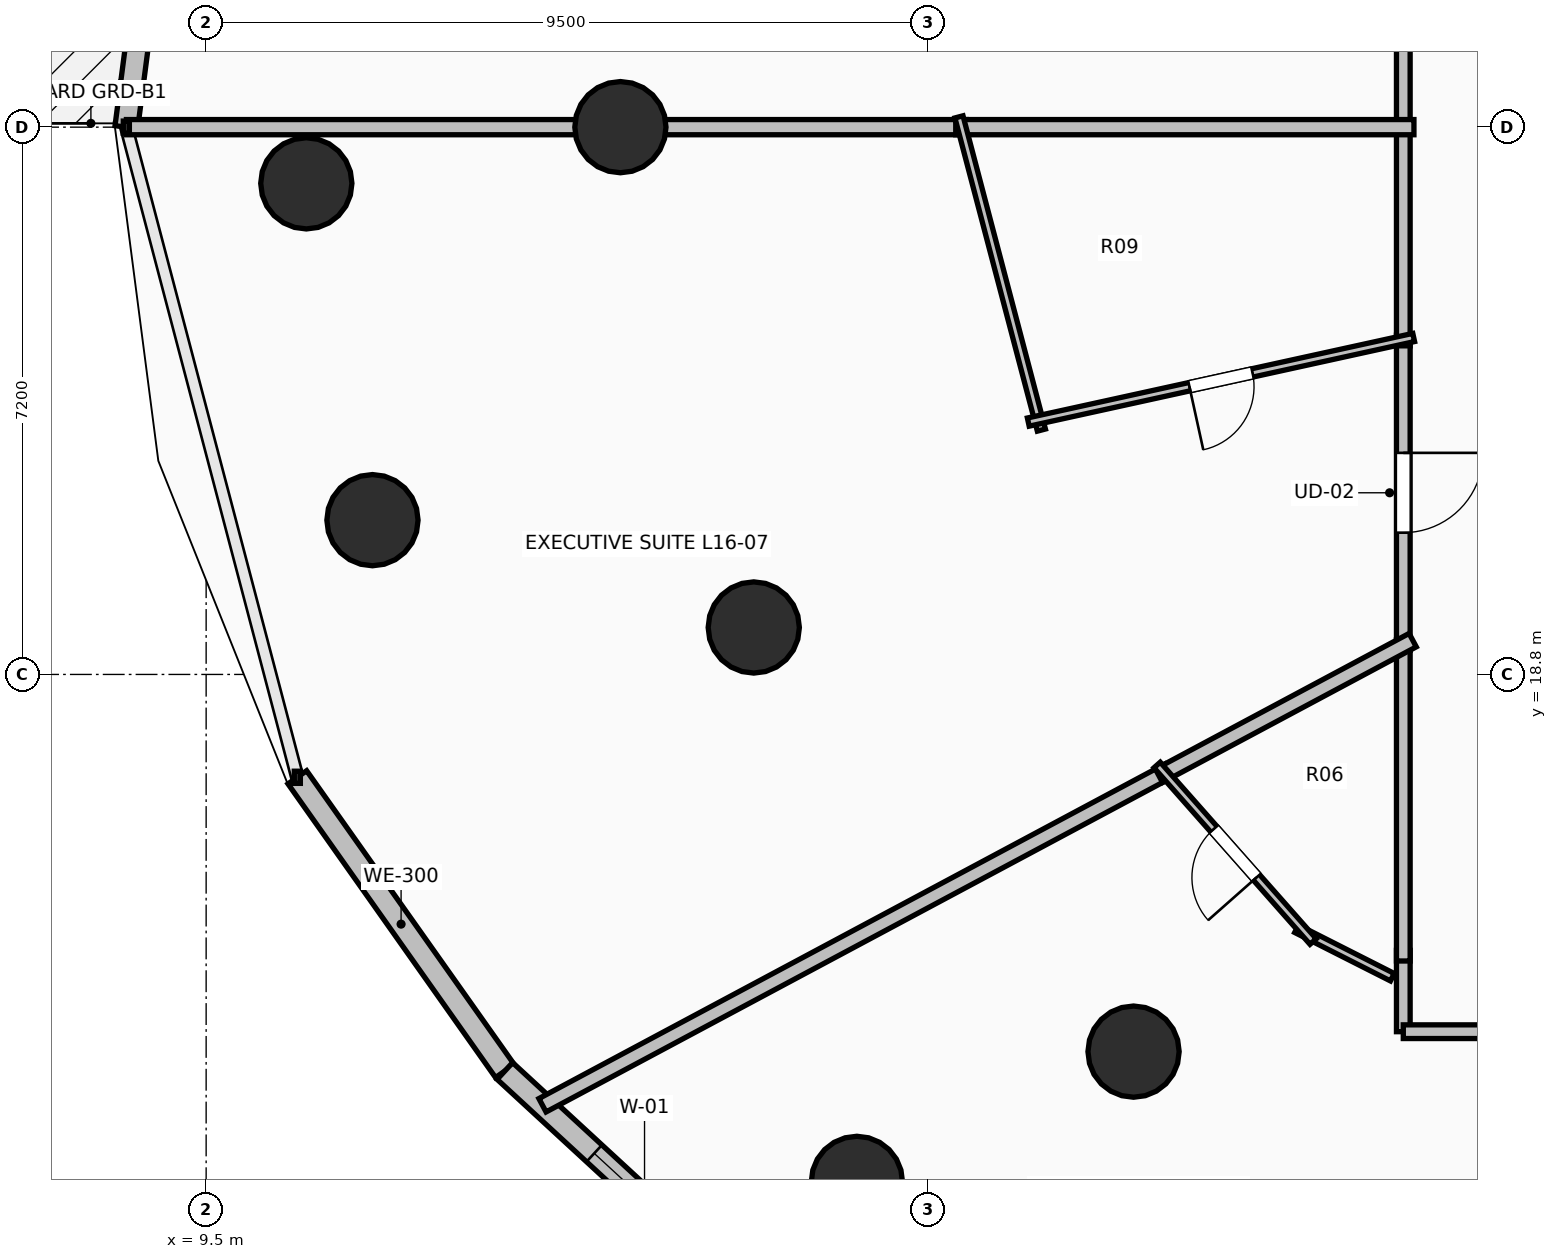
"""IFC4 building model, lengths in metres.
Left out: names, types, materials, properties, quantities, classifications, styles, units other than length and angle.
Written with IfcOpenShell. Run it as: python <this file> out.ifc"""

import sys

from ifc_helpers import new_model, si_unit, direction, frame, frame_2d, origin, origin_2d, place, context, subcontext, project, spatial, rectangle, circle, extrude, element, fill, save


model = new_model("IFC4")
c1 = context("Model", 3, precision=1e-05, world=origin(), true_north=direction((0.0, 1.0)))
c2 = subcontext(c1, "Body", "Model", "MODEL_VIEW")
j1 = project(units=[si_unit("LENGTHUNIT", "METRE"), si_unit("PLANEANGLEUNIT", "RADIAN")], contexts=[c1])
p1 = place(None, origin())
s1 = spatial("IfcSite", under=j1, at=p1, CompositionType="ELEMENT")
p2 = place(p1, origin())
s2 = spatial("IfcBuilding", under=s1, at=p2, CompositionType="ELEMENT")
p3 = place(p2, frame((0.0, 0.0, 62.5)))
s3 = spatial("IfcBuildingStorey", under=s2, at=p3, CompositionType="ELEMENT", Elevation=62.5)
for number, where, z_axis, x_axis in (
    (1, (14.95, 26.0, 0.0), (0.0, 0.0, 1.0), (-1.0, 0.0, 0.0)),
    (2, (16.705, 19.418, 0.0), (0.0, 0.0, 1.0), (-0.924, -0.383, 0.0)),
    (3, (21.701, 13.838, 0.0), (0.0, 0.0, 1.0), (-0.707, -0.707, 0.0)),
    (4, (10.818, 25.261, 0.0), (0.0, 0.0, 1.0), (-1.0, 0.0, 0.0)),
    (5, (11.688, 20.83, 0.0), (0.0, 0.0, 1.0), (-0.924, -0.383, 0.0)),
    (6, (18.061, 12.124, 0.0), (0.0, 0.0, 1.0), (-0.707, -0.707, 0.0)),
):
    element("IfcColumn", number, at=place(p3, frame(where, z_axis=z_axis, x_axis=x_axis)), inside=s3, PredefinedType="COLUMN", context=c2, shape_type="SweptSolid", body=[
        extrude(circle(Radius=0.6, at=origin_2d()), origin(), (0.0, 0.0, 1.0), 3.5),
    ])
p4 = place(p3, frame((9.018, 30.36, 0.0), z_axis=(0.0, 0.0, 1.0), x_axis=(-0.129144544413, -0.99162577954, 0.0)))
e7 = element("IfcWall", 7, at=p4, inside=s3, PredefinedType="STANDARD", context=c2, shape_type="SweptSolid", body=[
    extrude(rectangle(XDim=4.397, YDim=0.3, at=frame_2d((2.199, 0.0))), origin(), (0.0, 0.0, 1.0), 3.24),
])
p5 = place(p4, frame((1.299, 0.0, 0.85)))
e8 = element("IfcOpeningElement", 8, at=p5, cuts=e7, PredefinedType="OPENING", context=c2, shape_type="SweptSolid", body=[
    extrude(rectangle(XDim=1.8, YDim=2.19, at=frame_2d((0.9, 1.095))), frame((0.0, 0.165, 0.0), z_axis=(0.0, -1.0, 0.0), x_axis=(1.0, 0.0, 0.0)), (0.0, 0.0, 1.0), 0.33),
])
p6 = place(p3, frame((10.699, 17.447, 0.0), z_axis=(0.0, 0.0, 1.0), x_axis=(0.577130815624, -0.816651713803, 0.0)))
e9 = element("IfcWall", 9, at=p6, inside=s3, PredefinedType="STANDARD", context=c2, shape_type="SweptSolid", body=[
    extrude(rectangle(XDim=4.731, YDim=0.3, at=frame_2d((2.366, 0.0))), origin(), (0.0, 0.0, 1.0), 3.24),
])
p7 = place(p3, frame((13.43, 13.583, 0.0), z_axis=(0.0, 0.0, 1.0), x_axis=(0.735342629635, -0.677695519419, 0.0)))
e10 = element("IfcWall", 10, at=p7, inside=s3, PredefinedType="STANDARD", context=c2, shape_type="SweptSolid", body=[
    extrude(rectangle(XDim=4.997, YDim=0.3, at=frame_2d((2.499, 0.0))), origin(), (0.0, 0.0, 1.0), 3.24),
])
p8 = place(p7, frame((1.599, 0.0, 0.85)))
e11 = element("IfcOpeningElement", 11, at=p8, cuts=e10, PredefinedType="OPENING", context=c2, shape_type="SweptSolid", body=[
    extrude(rectangle(XDim=1.8, YDim=2.19, at=frame_2d((0.9, 1.095))), frame((0.0, 0.165, 0.0), z_axis=(0.0, -1.0, 0.0), x_axis=(1.0, 0.0, 0.0)), (0.0, 0.0, 1.0), 0.33),
])
p9 = place(p3, frame((25.25, 29.658, 0.0), z_axis=(0.0, 0.0, 1.0), x_axis=(0.0, -1.0, 0.0)))
e12 = element("IfcWall", 12, at=p9, inside=s3, PredefinedType="PARTITIONING", context=c2, shape_type="SweptSolid", body=[
    extrude(rectangle(XDim=3.718, YDim=0.18, at=frame_2d((1.859, 0.0))), origin(), (0.0, 0.0, 1.0), 2.432),
])
p10 = place(p9, frame((1.334, 0.0, 0.0)))
e13 = element("IfcOpeningElement", 13, at=p10, cuts=e12, PredefinedType="OPENING", context=c2, shape_type="SweptSolid", body=[
    extrude(rectangle(XDim=1.05, YDim=2.2, at=frame_2d((0.525, 1.1))), frame((0.0, 0.105, 0.0), z_axis=(0.0, -1.0, 0.0), x_axis=(1.0, 0.0, 0.0)), (0.0, 0.0, 1.0), 0.21),
])
p11 = place(p3, frame((25.25, 23.263, 0.0), z_axis=(0.0, 0.0, 1.0), x_axis=(0.0, -1.0, 0.0)))
e14 = element("IfcWall", 14, at=p11, inside=s3, PredefinedType="PARTITIONING", context=c2, shape_type="SweptSolid", body=[
    extrude(rectangle(XDim=4.146, YDim=0.18, at=frame_2d((2.073, 0.0))), origin(), (0.0, 0.0, 1.0), 3.24),
])
p12 = place(p11, frame((1.548, 0.0, 0.0)))
e15 = element("IfcOpeningElement", 15, at=p12, cuts=e14, PredefinedType="OPENING", context=c2, shape_type="SweptSolid", body=[
    extrude(rectangle(XDim=1.05, YDim=2.2, at=frame_2d((0.525, 1.1))), frame((0.0, 0.105, 0.0), z_axis=(0.0, -1.0, 0.0), x_axis=(1.0, 0.0, 0.0)), (0.0, 0.0, 1.0), 0.21),
])
p13 = place(p3, frame((25.25, 26.08, 0.0), z_axis=(0.0, 0.0, 1.0), x_axis=(0.0, -1.0, 0.0)))
e16 = element("IfcWall", 16, at=p13, inside=s3, PredefinedType="PARTITIONING", context=c2, shape_type="SweptSolid", body=[
    extrude(rectangle(XDim=2.957, YDim=0.18, at=frame_2d((1.479, 0.0))), origin(), (0.0, 0.0, 1.0), 3.24),
])
p14 = place(p3, frame((25.25, 15.17, 0.0), z_axis=(0.0, 0.0, 1.0), x_axis=(0.0, -1.0, 0.0)))
e17 = element("IfcWall", 17, at=p14, inside=s3, PredefinedType="PARTITIONING", context=c2, shape_type="SweptSolid", body=[
    extrude(rectangle(XDim=1.07, YDim=0.18, at=frame_2d((0.535, 0.0))), origin(), (0.0, 0.0, 1.0), 2.874),
])
p15 = place(p3, frame((25.25, 14.1, 0.0), z_axis=(0.0, 0.0, 1.0), x_axis=(1.0, 0.0, 0.0)))
e18 = element("IfcWall", 18, at=p15, inside=s3, PredefinedType="PARTITIONING", context=c2, shape_type="SweptSolid", body=[
    extrude(rectangle(XDim=4.859, YDim=0.18, at=frame_2d((2.429, 0.0))), origin(), (0.0, 0.0, 1.0), 2.432),
])
p16 = place(p15, frame((1.905, 0.0, 0.0)))
e19 = element("IfcOpeningElement", 19, at=p16, cuts=e18, PredefinedType="OPENING", context=c2, shape_type="SweptSolid", body=[
    extrude(rectangle(XDim=1.05, YDim=2.2, at=frame_2d((0.525, 1.1))), frame((0.0, 0.105, 0.0), z_axis=(0.0, -1.0, 0.0), x_axis=(1.0, 0.0, 0.0)), (0.0, 0.0, 1.0), 0.21),
])
p17 = place(p3, frame((25.25, 19.257, 0.0), z_axis=(0.0, 0.0, 1.0), x_axis=(0.0, -1.0, 0.0)))
e20 = element("IfcWall", 20, at=p17, inside=s3, PredefinedType="PARTITIONING", context=c2, shape_type="SweptSolid", body=[
    extrude(rectangle(XDim=4.227, YDim=0.18, at=frame_2d((2.114, 0.0))), origin(), (0.0, 0.0, 1.0), 2.432),
])
p18 = place(p3, frame((8.451, 26.0, 0.0), z_axis=(0.0, 0.0, 1.0), x_axis=(1.0, 0.0, 0.0)))
e21 = element("IfcWall", 21, at=p18, inside=s3, PredefinedType="PARTITIONING", context=c2, shape_type="SweptSolid", body=[
    extrude(rectangle(XDim=11.051, YDim=0.2, at=frame_2d((5.525, 0.0))), origin(), (0.0, 0.0, 1.0), 2.432),
])
p19 = place(p3, frame((19.362, 26.0, 0.0), z_axis=(0.0, 0.0, 1.0), x_axis=(1.0, 0.0, 0.0)))
e22 = element("IfcWall", 22, at=p19, inside=s3, PredefinedType="PARTITIONING", context=c2, shape_type="SweptSolid", body=[
    extrude(rectangle(XDim=6.028, YDim=0.2, at=frame_2d((3.014, 0.0))), origin(), (0.0, 0.0, 1.0), 2.874),
])
p20 = place(p3, frame((20.489, 22.015, 0.0), z_axis=(0.0, 0.0, 1.0), x_axis=(-0.254448175288, 0.967086410872, 0.0)))
e23 = element("IfcWall", 23, at=p20, inside=s3, PredefinedType="PARTITIONING", context=c2, shape_type="SweptSolid", body=[
    extrude(rectangle(XDim=4.261, YDim=0.11, at=frame_2d((2.13, 0.0))), origin(), (0.0, 0.0, 1.0), 3.24),
])
p21 = place(p3, frame((25.387, 23.233, 0.0), z_axis=(0.0, 0.0, 1.0), x_axis=(-0.976752510269, -0.214370085796, 0.0)))
e24 = element("IfcWall", 24, at=p21, inside=s3, PredefinedType="PARTITIONING", context=c2, shape_type="SweptSolid", body=[
    extrude(rectangle(XDim=5.191, YDim=0.11, at=frame_2d((2.595, 0.0))), origin(), (0.0, 0.0, 1.0), 2.874),
])
p22 = place(p21, frame((2.171, 0.0, 0.0)))
e25 = element("IfcOpeningElement", 25, at=p22, cuts=e24, PredefinedType="OPENING", context=c2, shape_type="SweptSolid", body=[
    extrude(rectangle(XDim=0.85, YDim=2.1, at=frame_2d((0.425, 1.05))), frame((0.0, 0.07, 0.0), z_axis=(0.0, -1.0, 0.0), x_axis=(1.0, 0.0, 0.0)), (0.0, 0.0, 1.0), 0.14),
])
p23 = place(p3, frame((13.925, 13.132, 0.0), z_axis=(0.0, 0.0, 1.0), x_axis=(0.881931293807, 0.471377972548, 0.0)))
e26 = element("IfcWall", 26, at=p23, inside=s3, PredefinedType="PARTITIONING", context=c2, shape_type="SweptSolid", body=[
    extrude(rectangle(XDim=9.336, YDim=0.2, at=frame_2d((4.668, 0.0))), origin(), (0.0, 0.0, 1.0), 2.624),
])
p24 = place(p3, frame((22.036, 17.467, 0.0), z_axis=(0.0, 0.0, 1.0), x_axis=(0.881916873027, 0.471404952317, 0.0)))
e27 = element("IfcWall", 27, at=p24, inside=s3, PredefinedType="PARTITIONING", context=c2, shape_type="SweptSolid", body=[
    extrude(rectangle(XDim=3.785, YDim=0.2, at=frame_2d((1.893, 0.0))), origin(), (0.0, 0.0, 1.0), 2.432),
])
p25 = place(p3, frame((25.106, 14.817, 0.0), z_axis=(0.0, 0.0, 1.0), x_axis=(-0.892342346526, 0.451359210161, 0.0)))
e28 = element("IfcWall", 28, at=p25, inside=s3, PredefinedType="PARTITIONING", context=c2, shape_type="SweptSolid", body=[
    extrude(rectangle(XDim=1.412, YDim=0.11, at=frame_2d((0.706, 0.0))), origin(), (0.0, 0.0, 1.0), 2.432),
])
p26 = place(p3, frame((24.064, 15.286, 0.0), z_axis=(0.0, 0.0, 1.0), x_axis=(-0.662165912504, 0.749357260802, 0.0)))
e29 = element("IfcWall", 29, at=p26, inside=s3, PredefinedType="PARTITIONING", context=c2, shape_type="SweptSolid", body=[
    extrude(rectangle(XDim=3.1, YDim=0.11, at=frame_2d((1.55, 0.0))), origin(), (0.0, 0.0, 1.0), 2.874),
])
p27 = place(p26, frame((1.125, 0.0, 0.0)))
e30 = element("IfcOpeningElement", 30, at=p27, cuts=e29, PredefinedType="OPENING", context=c2, shape_type="SweptSolid", body=[
    extrude(rectangle(XDim=0.85, YDim=2.1, at=frame_2d((0.425, 1.05))), frame((0.0, 0.07, 0.0), z_axis=(0.0, -1.0, 0.0), x_axis=(1.0, 0.0, 0.0)), (0.0, 0.0, 1.0), 0.14),
])
p28 = place(p3, frame((24.733, 6.144, 0.0), z_axis=(0.0, 0.0, 1.0), x_axis=(0.555577192504, 0.831464962082, 0.0)))
e31 = element("IfcWall", 31, at=p28, inside=s3, PredefinedType="PARTITIONING", context=c2, shape_type="SweptSolid", body=[
    extrude(rectangle(XDim=9.569, YDim=0.2, at=frame_2d((4.784, 0.0))), origin(), (0.0, 0.0, 1.0), 2.432),
])
p29 = place(p8, origin())
e32 = element("IfcWindow", 32, at=p29, inside=s3, PartitioningType="SINGLE_PANEL", PredefinedType="WINDOW", context=c2, shape_type="SweptSolid", body=[
    extrude(rectangle(XDim=1.8, YDim=2.19, at=frame_2d((0.9, 1.095))), frame((0.0, 0.03, 0.0), z_axis=(0.0, -1.0, 0.0), x_axis=(1.0, 0.0, 0.0)), (0.0, 0.0, 1.0), 0.06),
])
fill(e11, e32)
p30 = place(p12, origin())
e33 = element("IfcDoor", 33, at=p30, inside=s3, OperationType="SINGLE_SWING_LEFT", PredefinedType="DOOR", context=c2, shape_type="SweptSolid", body=[
    extrude(rectangle(XDim=1.05, YDim=2.2, at=frame_2d((0.525, 1.1))), frame((0.0, 0.025, 0.0), z_axis=(0.0, -1.0, 0.0), x_axis=(1.0, 0.0, 0.0)), (0.0, 0.0, 1.0), 0.05),
])
fill(e15, e33)
p31 = place(p22, origin())
e34 = element("IfcDoor", 34, at=p31, inside=s3, OperationType="SINGLE_SWING_RIGHT", PredefinedType="DOOR", context=c2, shape_type="SweptSolid", body=[
    extrude(rectangle(XDim=0.85, YDim=2.1, at=frame_2d((0.425, 1.05))), frame((0.0, 0.025, 0.0), z_axis=(0.0, -1.0, 0.0), x_axis=(1.0, 0.0, 0.0)), (0.0, 0.0, 1.0), 0.05),
])
fill(e25, e34)
p32 = place(p27, origin())
e35 = element("IfcDoor", 35, at=p32, inside=s3, OperationType="SINGLE_SWING_LEFT", PredefinedType="DOOR", context=c2, shape_type="SweptSolid", body=[
    extrude(rectangle(XDim=0.85, YDim=2.1, at=frame_2d((0.425, 1.05))), frame((0.0, 0.025, 0.0), z_axis=(0.0, -1.0, 0.0), x_axis=(1.0, 0.0, 0.0)), (0.0, 0.0, 1.0), 0.05),
])
fill(e30, e35)
save(model, sys.argv[1])
